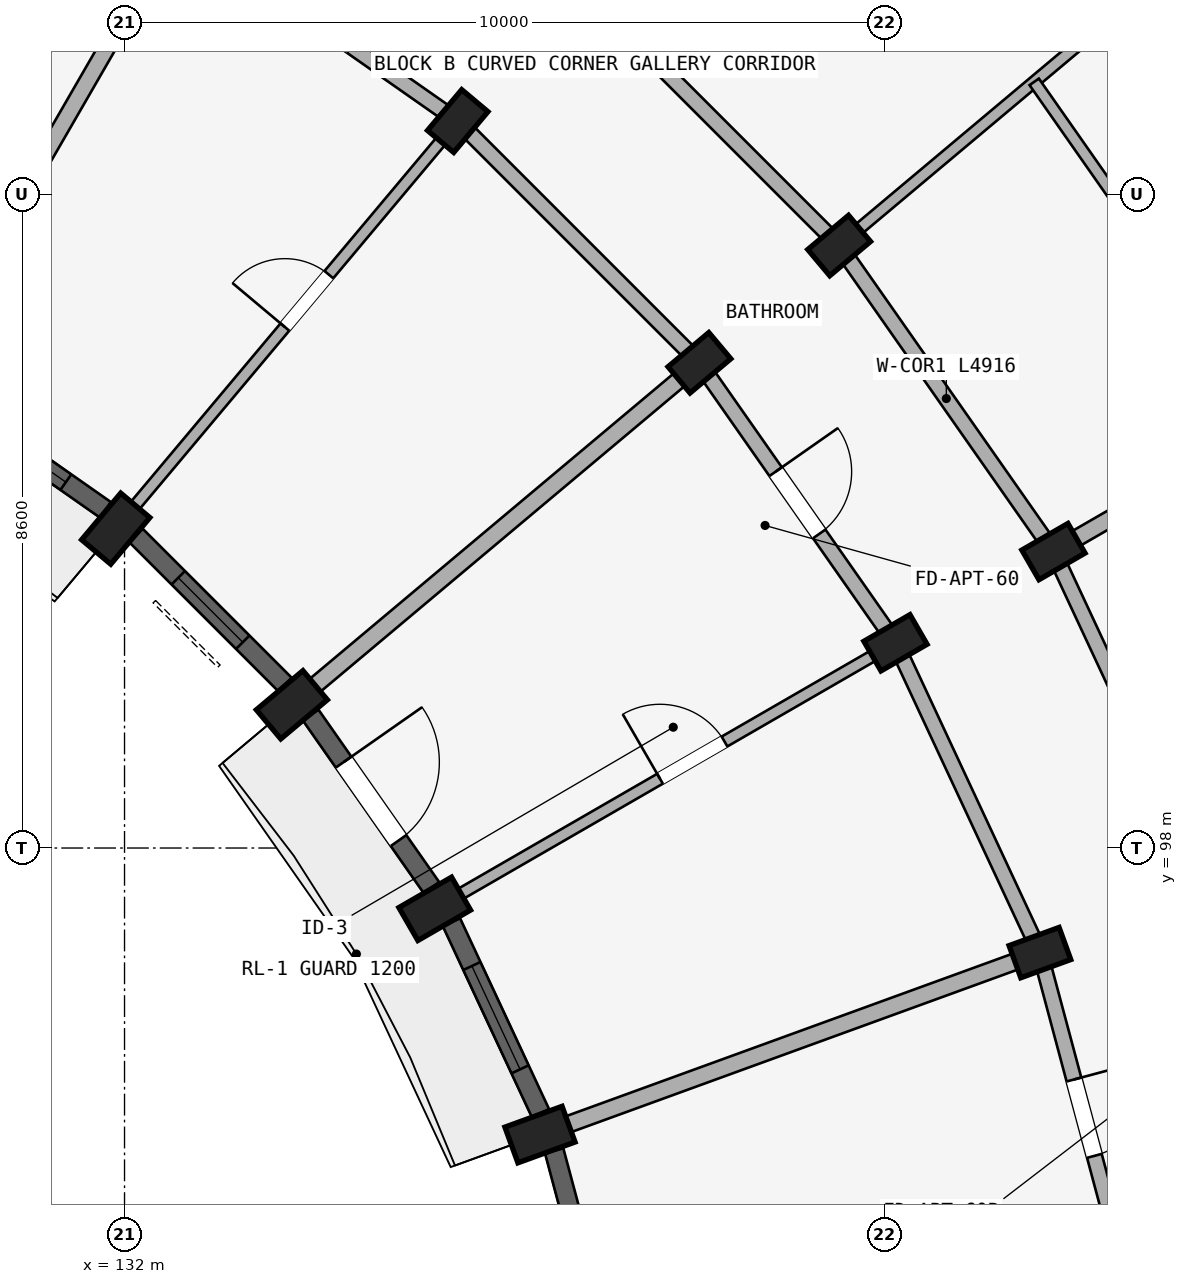
"""IFC4 building model, lengths in metres.
Left out: names, types, materials, properties, quantities, classifications, styles, units other than length and angle.
Written with IfcOpenShell. Run it as: python <this file> out.ifc"""

import sys

from ifc_helpers import new_model, si_unit, direction, frame, frame_2d, origin, origin_2d, place, context, subcontext, project, spatial, rectangle, extrude, element, fill, save


model = new_model("IFC4")
c1 = context("Model", 3, precision=1e-05, world=origin(), true_north=direction((0.0, 1.0)))
c2 = subcontext(c1, "Body", "Model", "MODEL_VIEW")
j1 = project(units=[si_unit("LENGTHUNIT", "METRE"), si_unit("PLANEANGLEUNIT", "RADIAN")], contexts=[c1])
p1 = place(None, origin())
s1 = spatial("IfcSite", under=j1, at=p1, CompositionType="ELEMENT")
p2 = place(p1, origin())
s2 = spatial("IfcBuilding", under=s1, at=p2, CompositionType="ELEMENT")
p3 = place(p2, frame((0.0, 0.0, 24.45)))
s3 = spatial("IfcBuildingStorey", under=s2, at=p3, CompositionType="ELEMENT", Elevation=24.45)
p4 = place(p3, frame((131.885, 102.202, 0.0), z_axis=(0.0, 0.0, 1.0), x_axis=(-0.766044443119, 0.642787609687, 0.0)))
e1 = element("IfcColumn", 1, at=p4, inside=s3, PredefinedType="COLUMN", context=c2, shape_type="SweptSolid", body=[
    extrude(rectangle(XDim=0.5, YDim=0.8, at=origin_2d()), origin(), (0.0, 0.0, 1.0), 2.93),
])
p5 = place(p3, frame((136.384, 107.564, 0.0), z_axis=(0.0, 0.0, 1.0), x_axis=(-0.766044443119, 0.642787609687, 0.0)))
e2 = element("IfcColumn", 2, at=p5, inside=s3, PredefinedType="COLUMN", context=c2, shape_type="SweptSolid", body=[
    extrude(rectangle(XDim=0.45, YDim=0.7, at=origin_2d()), origin(), (0.0, 0.0, 1.0), 2.93),
])
p6 = place(p3, frame((134.202, 99.885, 0.0), z_axis=(0.0, 0.0, 1.0), x_axis=(-0.642787609687, 0.766044443119, 0.0)))
e3 = element("IfcColumn", 3, at=p6, inside=s3, PredefinedType="COLUMN", context=c2, shape_type="SweptSolid", body=[
    extrude(rectangle(XDim=0.5, YDim=0.8, at=origin_2d()), origin(), (0.0, 0.0, 1.0), 2.93),
])
for number, where, z_axis, x_axis in (
    (4, (139.564, 104.384, 0.0), (0.0, 0.0, 1.0), (-0.643, 0.766, 0.0)),
    (5, (141.402, 105.927, 0.0), (0.0, 0.0, 1.0), (-0.643, 0.766, 0.0)),
):
    element("IfcColumn", number, at=place(p3, frame(where, z_axis=z_axis, x_axis=x_axis)), inside=s3, PredefinedType="COLUMN", context=c2, shape_type="SweptSolid", body=[
        extrude(rectangle(XDim=0.45, YDim=0.7, at=origin_2d()), origin(), (0.0, 0.0, 1.0), 2.93),
    ])
p7 = place(p3, frame((136.081, 97.2, 0.0), z_axis=(0.0, 0.0, 1.0), x_axis=(-0.5, 0.866025403784, 0.0)))
e6 = element("IfcColumn", 6, at=p7, inside=s3, PredefinedType="COLUMN", context=c2, shape_type="SweptSolid", body=[
    extrude(rectangle(XDim=0.5, YDim=0.8, at=origin_2d()), origin(), (0.0, 0.0, 1.0), 2.93),
])
for number, where, z_axis, x_axis in (
    (7, (142.144, 100.7, 0.0), (0.0, 0.0, 1.0), (-0.5, 0.866, 0.0)),
    (8, (144.222, 101.9, 0.0), (0.0, 0.0, 1.0), (-0.5, 0.866, 0.0)),
):
    element("IfcColumn", number, at=place(p3, frame(where, z_axis=z_axis, x_axis=x_axis)), inside=s3, PredefinedType="COLUMN", context=c2, shape_type="SweptSolid", body=[
        extrude(rectangle(XDim=0.45, YDim=0.7, at=origin_2d()), origin(), (0.0, 0.0, 1.0), 2.93),
    ])
p8 = place(p3, frame((137.466, 94.23, 0.0), z_axis=(0.0, 0.0, 1.0), x_axis=(-0.342020143326, 0.939692620786, 0.0)))
e9 = element("IfcColumn", 9, at=p8, inside=s3, PredefinedType="COLUMN", context=c2, shape_type="SweptSolid", body=[
    extrude(rectangle(XDim=0.5, YDim=0.8, at=origin_2d()), origin(), (0.0, 0.0, 1.0), 2.93),
])
p9 = place(p3, frame((144.044, 96.624, 0.0), z_axis=(0.0, 0.0, 1.0), x_axis=(-0.342020143326, 0.939692620786, 0.0)))
e10 = element("IfcColumn", 10, at=p9, inside=s3, PredefinedType="COLUMN", context=c2, shape_type="SweptSolid", body=[
    extrude(rectangle(XDim=0.45, YDim=0.7, at=origin_2d()), origin(), (0.0, 0.0, 1.0), 2.93),
])
p10 = place(p3, frame((132.7, 110.144, 0.0), z_axis=(0.0, 0.0, 1.0), x_axis=(0.819155404658, -0.573571637217, 0.0)))
e11 = element("IfcWall", 11, at=p10, inside=s3, PredefinedType="STANDARD", context=c2, shape_type="SweptSolid", body=[
    extrude(rectangle(XDim=4.497, YDim=0.2, at=frame_2d((2.249, 0.0))), origin(), (0.0, 0.0, 1.0), 2.372),
])
p11 = place(p10, frame((1.709, 0.0, 0.0)))
e12 = element("IfcOpeningElement", 12, at=p11, cuts=e11, PredefinedType="OPENING", context=c2, shape_type="SweptSolid", body=[
    extrude(rectangle(XDim=1.08, YDim=2.15, at=frame_2d((0.54, 1.075))), frame((0.0, 0.11, 0.0), z_axis=(0.0, -1.0, 0.0), x_axis=(1.0, 0.0, 0.0)), (0.0, 0.0, 1.0), 0.22),
])
p12 = place(p3, frame((136.384, 107.564, 0.0), z_axis=(0.0, 0.0, 1.0), x_axis=(0.707106781187, -0.707106781187, 0.0)))
e13 = element("IfcWall", 13, at=p12, inside=s3, PredefinedType="STANDARD", context=c2, shape_type="SweptSolid", body=[
    extrude(rectangle(XDim=4.497, YDim=0.2, at=frame_2d((2.249, 0.0))), origin(), (0.0, 0.0, 1.0), 2.372),
])
p13 = place(p3, frame((137.927, 109.402, 0.0), z_axis=(0.0, 0.0, 1.0), x_axis=(0.707106781187, -0.707106781187, 0.0)))
e14 = element("IfcWall", 14, at=p13, inside=s3, PredefinedType="STANDARD", context=c2, shape_type="SweptSolid", body=[
    extrude(rectangle(XDim=4.916, YDim=0.2, at=frame_2d((2.458, 0.0))), origin(), (0.0, 0.0, 1.0), 2.372),
])
p14 = place(p3, frame((139.564, 104.384, 0.0), z_axis=(0.0, 0.0, 1.0), x_axis=(0.573571637217, -0.819155404658, 0.0)))
e15 = element("IfcWall", 15, at=p14, inside=s3, PredefinedType="STANDARD", context=c2, shape_type="SweptSolid", body=[
    extrude(rectangle(XDim=4.497, YDim=0.2, at=frame_2d((2.249, 0.0))), origin(), (0.0, 0.0, 1.0), 2.372),
])
p15 = place(p14, frame((1.749, 0.0, 0.0)))
e16 = element("IfcOpeningElement", 16, at=p15, cuts=e15, PredefinedType="OPENING", context=c2, shape_type="SweptSolid", body=[
    extrude(rectangle(XDim=1.0, YDim=2.15, at=frame_2d((0.5, 1.075))), frame((0.0, 0.11, 0.0), z_axis=(0.0, -1.0, 0.0), x_axis=(1.0, 0.0, 0.0)), (0.0, 0.0, 1.0), 0.22),
])
p16 = place(p3, frame((141.402, 105.927, 0.0), z_axis=(0.0, 0.0, 1.0), x_axis=(0.573592335331, -0.819140911474, 0.0)))
e17 = element("IfcWall", 17, at=p16, inside=s3, PredefinedType="STANDARD", context=c2, shape_type="SweptSolid", body=[
    extrude(rectangle(XDim=4.916, YDim=0.2, at=frame_2d((2.458, 0.0))), origin(), (0.0, 0.0, 1.0), 2.372),
])
p17 = place(p3, frame((142.144, 100.7, 0.0), z_axis=(0.0, 0.0, 1.0), x_axis=(0.422617978463, -0.906307919131, 0.0)))
e18 = element("IfcWall", 18, at=p17, inside=s3, PredefinedType="STANDARD", context=c2, shape_type="SweptSolid", body=[
    extrude(rectangle(XDim=4.497, YDim=0.2, at=frame_2d((2.249, 0.0))), origin(), (0.0, 0.0, 1.0), 2.372),
])
p18 = place(p3, frame((144.222, 101.9, 0.0), z_axis=(0.0, 0.0, 1.0), x_axis=(0.422629854778, -0.906302381024, 0.0)))
e19 = element("IfcWall", 19, at=p18, inside=s3, PredefinedType="STANDARD", context=c2, shape_type="SweptSolid", body=[
    extrude(rectangle(XDim=4.915, YDim=0.2, at=frame_2d((2.458, 0.0))), origin(), (0.0, 0.0, 1.0), 2.372),
])
p19 = place(p18, frame((1.958, 0.0, 0.0)))
e20 = element("IfcOpeningElement", 20, at=p19, cuts=e19, PredefinedType="OPENING", context=c2, shape_type="SweptSolid", body=[
    extrude(rectangle(XDim=1.0, YDim=2.15, at=frame_2d((0.5, 1.075))), frame((0.0, 0.11, 0.0), z_axis=(0.0, -1.0, 0.0), x_axis=(1.0, 0.0, 0.0)), (0.0, 0.0, 1.0), 0.22),
])
p20 = place(p3, frame((144.044, 96.624, 0.0), z_axis=(0.0, 0.0, 1.0), x_axis=(0.258787642463, -0.965934240054, 0.0)))
e21 = element("IfcWall", 21, at=p20, inside=s3, PredefinedType="STANDARD", context=c2, shape_type="SweptSolid", body=[
    extrude(rectangle(XDim=4.497, YDim=0.2, at=frame_2d((2.249, 0.0))), origin(), (0.0, 0.0, 1.0), 2.372),
])
p21 = place(p20, frame((1.729, 0.0, 0.0)))
e22 = element("IfcOpeningElement", 22, at=p21, cuts=e21, PredefinedType="OPENING", context=c2, shape_type="SweptSolid", body=[
    extrude(rectangle(XDim=1.04, YDim=2.15, at=frame_2d((0.52, 1.075))), frame((0.0, 0.11, 0.0), z_axis=(0.0, -1.0, 0.0), x_axis=(1.0, 0.0, 0.0)), (0.0, 0.0, 1.0), 0.22),
])
p22 = place(p3, frame((129.3, 104.254, 0.0), z_axis=(0.0, 0.0, 1.0), x_axis=(0.499997969693, 0.866026575979, 0.0)))
e23 = element("IfcWall", 23, at=p22, inside=s3, PredefinedType="STANDARD", context=c2, shape_type="SweptSolid", body=[
    extrude(rectangle(XDim=6.75, YDim=0.22, at=frame_2d((3.375, 0.0))), origin(), (0.0, 0.0, 1.0), 2.372),
])
p23 = place(p3, frame((132.013, 102.355, 0.0), z_axis=(0.0, 0.0, 1.0), x_axis=(0.642784846501, 0.766046761698, 0.0)))
e24 = element("IfcWall", 24, at=p23, inside=s3, PredefinedType="PARTITIONING", context=c2, shape_type="SweptSolid", body=[
    extrude(rectangle(XDim=6.75, YDim=0.15, at=frame_2d((3.375, 0.0))), origin(), (0.0, 0.0, 1.0), 2.372),
])
p24 = place(p23, frame((3.262, 0.0, 0.0)))
e25 = element("IfcOpeningElement", 25, at=p24, cuts=e24, PredefinedType="OPENING", context=c2, shape_type="SweptSolid", body=[
    extrude(rectangle(XDim=0.9, YDim=2.1, at=frame_2d((0.45, 1.05))), frame((0.0, 0.085, 0.0), z_axis=(0.0, -1.0, 0.0), x_axis=(1.0, 0.0, 0.0)), (0.0, 0.0, 1.0), 0.17),
])
p25 = place(p3, frame((134.355, 100.013, 0.0), z_axis=(0.0, 0.0, 1.0), x_axis=(0.766046761698, 0.642784846501, 0.0)))
e26 = element("IfcWall", 26, at=p25, inside=s3, PredefinedType="STANDARD", context=c2, shape_type="SweptSolid", body=[
    extrude(rectangle(XDim=6.75, YDim=0.22, at=frame_2d((3.375, 0.0))), origin(), (0.0, 0.0, 1.0), 2.372),
])
p26 = place(p3, frame((141.479, 105.991, 0.0), z_axis=(0.0, 0.0, 1.0), x_axis=(0.766046835987, 0.642784757967, 0.0)))
e27 = element("IfcWall", 27, at=p26, inside=s3, PredefinedType="PARTITIONING", context=c2, shape_type="SweptSolid", body=[
    extrude(rectangle(XDim=17.42, YDim=0.15, at=frame_2d((8.71, 0.0))), origin(), (0.0, 0.0, 1.0), 2.372),
])
p27 = place(p26, frame((7.5, 0.0, 0.0)))
e28 = element("IfcOpeningElement", 28, at=p27, cuts=e27, PredefinedType="OPENING", context=c2, shape_type="SweptSolid", body=[
    extrude(rectangle(XDim=0.8, YDim=2.1, at=frame_2d((0.4, 1.05))), frame((0.0, 0.085, 0.0), z_axis=(0.0, -1.0, 0.0), x_axis=(1.0, 0.0, 0.0)), (0.0, 0.0, 1.0), 0.17),
])
p28 = place(p3, frame((136.254, 97.3, 0.0), z_axis=(0.0, 0.0, 1.0), x_axis=(0.866026575979, 0.499997969693, 0.0)))
e29 = element("IfcWall", 29, at=p28, inside=s3, PredefinedType="PARTITIONING", context=c2, shape_type="SweptSolid", body=[
    extrude(rectangle(XDim=6.75, YDim=0.15, at=frame_2d((3.375, 0.0))), origin(), (0.0, 0.0, 1.0), 2.372),
])
p29 = place(p28, frame((3.222, 0.0, 0.0)))
e30 = element("IfcOpeningElement", 30, at=p29, cuts=e29, PredefinedType="OPENING", context=c2, shape_type="SweptSolid", body=[
    extrude(rectangle(XDim=0.98, YDim=2.12, at=frame_2d((0.49, 1.06))), frame((0.0, 0.085, 0.0), z_axis=(0.0, -1.0, 0.0), x_axis=(1.0, 0.0, 0.0)), (0.0, 0.0, 1.0), 0.17),
])
p30 = place(p3, frame((144.309, 101.95, 0.0), z_axis=(0.0, 0.0, 1.0), x_axis=(0.866026648973, 0.499997843263, 0.0)))
e31 = element("IfcWall", 31, at=p30, inside=s3, PredefinedType="STANDARD", context=c2, shape_type="SweptSolid", body=[
    extrude(rectangle(XDim=17.42, YDim=0.22, at=frame_2d((8.71, 0.0))), origin(), (0.0, 0.0, 1.0), 2.372),
])
p31 = place(p3, frame((137.654, 94.298, 0.0), z_axis=(0.0, 0.0, 1.0), x_axis=(0.939696231917, 0.342010221662, 0.0)))
e32 = element("IfcWall", 32, at=p31, inside=s3, PredefinedType="STANDARD", context=c2, shape_type="SweptSolid", body=[
    extrude(rectangle(XDim=6.75, YDim=0.22, at=frame_2d((3.375, 0.0))), origin(), (0.0, 0.0, 1.0), 2.372),
])
p32 = place(p3, frame((143.969, 108.08, 0.0), z_axis=(0.0, 0.0, 1.0), x_axis=(0.573569599955, -0.819156831143, 0.0)))
e33 = element("IfcWall", 33, at=p32, inside=s3, PredefinedType="PLUMBINGWALL", context=c2, shape_type="SweptSolid", body=[
    extrude(rectangle(XDim=5.5, YDim=0.15, at=frame_2d((2.75, 0.0))), origin(), (0.0, 0.0, 1.0), 2.372),
])
p33 = place(p32, frame((2.35, 0.0, 0.0)))
e34 = element("IfcOpeningElement", 34, at=p33, cuts=e33, PredefinedType="OPENING", context=c2, shape_type="SweptSolid", body=[
    extrude(rectangle(XDim=0.8, YDim=2.1, at=frame_2d((0.4, 1.05))), frame((0.0, 0.085, 0.0), z_axis=(0.0, -1.0, 0.0), x_axis=(1.0, 0.0, 0.0)), (0.0, 0.0, 1.0), 0.17),
])
p34 = place(p3, frame((129.479, 104.038, 0.0), z_axis=(0.0, 0.0, 1.0), x_axis=(0.819111815273, -0.573633885053, 0.0)))
e35 = element("IfcWall", 35, at=p34, inside=s3, PredefinedType="STANDARD", context=c2, shape_type="SweptSolid", body=[
    extrude(rectangle(XDim=2.77, YDim=0.25, at=frame_2d((1.385, 0.0))), origin(), (0.0, 0.0, 1.0), 2.422),
])
p35 = place(p34, frame((0.635, 0.0, 0.572)))
e36 = element("IfcOpeningElement", 36, at=p35, cuts=e35, PredefinedType="OPENING", context=c2, shape_type="SweptSolid", body=[
    extrude(rectangle(XDim=1.5, YDim=1.65, at=frame_2d((0.75, 0.825))), frame((0.0, 0.135, 0.0), z_axis=(0.0, -1.0, 0.0), x_axis=(1.0, 0.0, 0.0)), (0.0, 0.0, 1.0), 0.27),
])
p36 = place(p3, frame((132.152, 102.111, 0.0), z_axis=(0.0, 0.0, 1.0), x_axis=(0.707106781187, -0.707106781187, 0.0)))
e37 = element("IfcWall", 37, at=p36, inside=s3, PredefinedType="STANDARD", context=c2, shape_type="SweptSolid", body=[
    extrude(rectangle(XDim=2.77, YDim=0.25, at=frame_2d((1.385, 0.0))), origin(), (0.0, 0.0, 1.0), 2.422),
])
p37 = place(p36, frame((0.785, 0.0, 0.722)))
e38 = element("IfcOpeningElement", 38, at=p37, cuts=e37, PredefinedType="OPENING", context=c2, shape_type="SweptSolid", body=[
    extrude(rectangle(XDim=1.2, YDim=1.5, at=frame_2d((0.6, 0.75))), frame((0.0, 0.135, 0.0), z_axis=(0.0, -1.0, 0.0), x_axis=(1.0, 0.0, 0.0)), (0.0, 0.0, 1.0), 0.27),
])
p38 = place(p3, frame((134.449, 99.748, 0.0), z_axis=(0.0, 0.0, 1.0), x_axis=(0.573633885053, -0.819111815273, 0.0)))
e39 = element("IfcWall", 39, at=p38, inside=s3, PredefinedType="STANDARD", context=c2, shape_type="SweptSolid", body=[
    extrude(rectangle(XDim=2.77, YDim=0.25, at=frame_2d((1.385, 0.0))), origin(), (0.0, 0.0, 1.0), 2.422),
])
p39 = place(p38, frame((0.755, 0.0, 0.0)))
e40 = element("IfcOpeningElement", 40, at=p39, cuts=e39, PredefinedType="OPENING", context=c2, shape_type="SweptSolid", body=[
    extrude(rectangle(XDim=1.26, YDim=2.15, at=frame_2d((0.63, 1.075))), frame((0.0, 0.135, 0.0), z_axis=(0.0, -1.0, 0.0), x_axis=(1.0, 0.0, 0.0)), (0.0, 0.0, 1.0), 0.27),
])
p40 = place(p3, frame((136.302, 97.023, 0.0), z_axis=(0.0, 0.0, 1.0), x_axis=(0.422649007088, -0.906293449611, 0.0)))
e41 = element("IfcWall", 41, at=p40, inside=s3, PredefinedType="STANDARD", context=c2, shape_type="SweptSolid", body=[
    extrude(rectangle(XDim=2.77, YDim=0.25, at=frame_2d((1.385, 0.0))), origin(), (0.0, 0.0, 1.0), 2.422),
])
p41 = place(p40, frame((0.635, 0.0, 0.572)))
e42 = element("IfcOpeningElement", 42, at=p41, cuts=e41, PredefinedType="OPENING", context=c2, shape_type="SweptSolid", body=[
    extrude(rectangle(XDim=1.5, YDim=1.65, at=frame_2d((0.75, 0.825))), frame((0.0, 0.135, 0.0), z_axis=(0.0, -1.0, 0.0), x_axis=(1.0, 0.0, 0.0)), (0.0, 0.0, 1.0), 0.27),
])
p42 = place(p3, frame((137.653, 94.017, 0.0), z_axis=(0.0, 0.0, 1.0), x_axis=(0.25878161084, -0.965935855992, 0.0)))
e43 = element("IfcWall", 43, at=p42, inside=s3, PredefinedType="STANDARD", context=c2, shape_type="SweptSolid", body=[
    extrude(rectangle(XDim=2.77, YDim=0.25, at=frame_2d((1.385, 0.0))), origin(), (0.0, 0.0, 1.0), 2.422),
])
p43 = place(p42, frame((0.785, 0.0, 0.722)))
e44 = element("IfcOpeningElement", 44, at=p43, cuts=e43, PredefinedType="OPENING", context=c2, shape_type="SweptSolid", body=[
    extrude(rectangle(XDim=1.2, YDim=1.5, at=frame_2d((0.6, 0.75))), frame((0.0, 0.135, 0.0), z_axis=(0.0, -1.0, 0.0), x_axis=(1.0, 0.0, 0.0)), (0.0, 0.0, 1.0), 0.27),
])
p44 = place(p35, origin())
e45 = element("IfcWindow", 45, at=p44, inside=s3, PartitioningType="DOUBLE_PANEL_VERTICAL", PredefinedType="WINDOW", context=c2, shape_type="SweptSolid", body=[
    extrude(rectangle(XDim=1.5, YDim=1.65, at=frame_2d((0.75, 0.825))), frame((0.0, 0.03, 0.0), z_axis=(0.0, -1.0, 0.0), x_axis=(1.0, 0.0, 0.0)), (0.0, 0.0, 1.0), 0.06),
])
fill(e36, e45)
p45 = place(p37, origin())
e46 = element("IfcWindow", 46, at=p45, inside=s3, PartitioningType="SINGLE_PANEL", PredefinedType="WINDOW", context=c2, shape_type="SweptSolid", body=[
    extrude(rectangle(XDim=1.2, YDim=1.5, at=frame_2d((0.6, 0.75))), frame((0.0, 0.03, 0.0), z_axis=(0.0, -1.0, 0.0), x_axis=(1.0, 0.0, 0.0)), (0.0, 0.0, 1.0), 0.06),
])
fill(e38, e46)
p46 = place(p41, origin())
e47 = element("IfcWindow", 47, at=p46, inside=s3, PartitioningType="DOUBLE_PANEL_VERTICAL", PredefinedType="WINDOW", context=c2, shape_type="SweptSolid", body=[
    extrude(rectangle(XDim=1.5, YDim=1.65, at=frame_2d((0.75, 0.825))), frame((0.0, 0.03, 0.0), z_axis=(0.0, -1.0, 0.0), x_axis=(1.0, 0.0, 0.0)), (0.0, 0.0, 1.0), 0.06),
])
fill(e42, e47)
p47 = place(p24, origin())
e48 = element("IfcDoor", 48, at=p47, inside=s3, OperationType="SINGLE_SWING_LEFT", PredefinedType="DOOR", context=c2, shape_type="SweptSolid", body=[
    extrude(rectangle(XDim=0.9, YDim=2.1, at=frame_2d((0.45, 1.05))), frame((0.0, 0.025, 0.0), z_axis=(0.0, -1.0, 0.0), x_axis=(1.0, 0.0, 0.0)), (0.0, 0.0, 1.0), 0.05),
])
fill(e25, e48)
p48 = place(p29, frame((0.98, 0.0, 0.0), z_axis=(0.0, 0.0, 1.0), x_axis=(-1.0, 0.0, 0.0)))
e49 = element("IfcDoor", 49, at=p48, inside=s3, OperationType="SINGLE_SWING_RIGHT", PredefinedType="DOOR", context=c2, shape_type="SweptSolid", body=[
    extrude(rectangle(XDim=0.98, YDim=2.12, at=frame_2d((0.49, 1.06))), frame((0.0, 0.025, 0.0), z_axis=(0.0, -1.0, 0.0), x_axis=(1.0, 0.0, 0.0)), (0.0, 0.0, 1.0), 0.05),
])
fill(e30, e49)
p49 = place(p15, origin())
e50 = element("IfcDoor", 50, at=p49, inside=s3, OperationType="SINGLE_SWING_LEFT", PredefinedType="DOOR", context=c2, shape_type="SweptSolid", body=[
    extrude(rectangle(XDim=1.0, YDim=2.15, at=frame_2d((0.5, 1.075))), frame((0.0, 0.025, 0.0), z_axis=(0.0, -1.0, 0.0), x_axis=(1.0, 0.0, 0.0)), (0.0, 0.0, 1.0), 0.05),
])
fill(e16, e50)
p50 = place(p21, frame((1.04, 0.0, 0.0), z_axis=(0.0, 0.0, 1.0), x_axis=(-1.0, 0.0, 0.0)))
e51 = element("IfcDoor", 51, at=p50, inside=s3, OperationType="SINGLE_SWING_RIGHT", PredefinedType="DOOR", context=c2, shape_type="SweptSolid", body=[
    extrude(rectangle(XDim=1.04, YDim=2.15, at=frame_2d((0.52, 1.075))), frame((0.0, 0.025, 0.0), z_axis=(0.0, -1.0, 0.0), x_axis=(1.0, 0.0, 0.0)), (0.0, 0.0, 1.0), 0.05),
])
fill(e22, e51)
p51 = place(p39, frame((1.26, 0.0, 0.0), z_axis=(0.0, 0.0, 1.0), x_axis=(-1.0, 0.0, 0.0)))
e52 = element("IfcDoor", 52, at=p51, inside=s3, OperationType="SINGLE_SWING_RIGHT", PredefinedType="DOOR", context=c2, shape_type="SweptSolid", body=[
    extrude(rectangle(XDim=1.26, YDim=2.15, at=frame_2d((0.63, 1.075))), frame((0.0, 0.025, 0.0), z_axis=(0.0, -1.0, 0.0), x_axis=(1.0, 0.0, 0.0)), (0.0, 0.0, 1.0), 0.05),
])
fill(e40, e52)
save(model, sys.argv[1])
